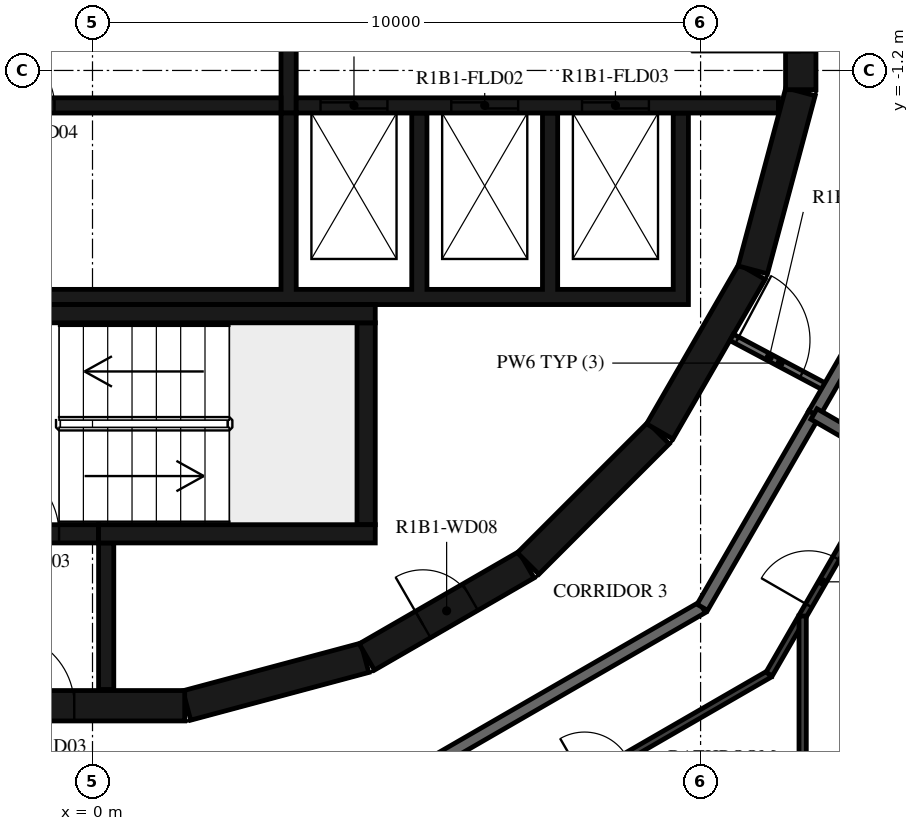
"""IFC4 building model, lengths in metres.
Left out: names, types, materials, properties, quantities, classifications, styles, units other than length and angle.
Written with IfcOpenShell. Run it as: python <this file> out.ifc"""

import sys

from ifc_helpers import new_model, si_unit, direction, frame, frame_2d, origin, place, context, subcontext, project, spatial, polyline, rectangle, outline, extrude, element, fill, save


model = new_model("IFC4")
c1 = context("Model", 3, precision=1e-05, world=origin(), true_north=direction((0.0, 1.0)))
c2 = subcontext(c1, "Body", "Model", "MODEL_VIEW")
j1 = project(units=[si_unit("LENGTHUNIT", "METRE"), si_unit("PLANEANGLEUNIT", "RADIAN")], contexts=[c1])
p1 = place(None, origin())
s1 = spatial("IfcSite", under=j1, at=p1, CompositionType="ELEMENT")
p2 = place(p1, origin())
s2 = spatial("IfcBuilding", under=s1, at=p2, CompositionType="ELEMENT")
p3 = place(p2, frame((0.0, 0.0, 48.9)))
s3 = spatial("IfcBuildingStorey", under=s2, at=p3, CompositionType="ELEMENT", Elevation=48.9)
p4 = place(p3, frame((1.55, -11.643, 0.0), z_axis=(0.0, 0.0, 1.0), x_axis=(0.965948410781, 0.258734743916, 0.0)))
e1 = element("IfcWall", 1, at=p4, inside=s3, PredefinedType="SHEAR", context=c2, shape_type="SweptSolid", body=[
    extrude(rectangle(XDim=3.033, YDim=0.5, at=frame_2d((1.516, 0.0))), origin(), (0.0, 0.0, 1.0), 3.12),
])
p5 = place(p3, frame((4.51, -10.845, 0.0), z_axis=(0.0, 0.0, 1.0), x_axis=(0.865975092491, 0.500087131594, 0.0)))
e2 = element("IfcWall", 2, at=p5, inside=s3, PredefinedType="SHEAR", context=c2, shape_type="SweptSolid", body=[
    extrude(rectangle(XDim=3.033, YDim=0.5, at=frame_2d((1.516, 0.0))), origin(), (0.0, 0.0, 1.0), 3.12),
])
p6 = place(p5, frame((1.066, 0.0, 0.0)))
e3 = element("IfcOpeningElement", 3, at=p6, cuts=e2, PredefinedType="OPENING", context=c2, shape_type="SweptSolid", body=[
    extrude(rectangle(XDim=0.9, YDim=2.1, at=frame_2d((0.45, 1.05))), frame((0.0, 0.26, 0.0), z_axis=(0.0, -1.0, 0.0), x_axis=(1.0, 0.0, 0.0)), (0.0, 0.0, 1.0), 0.52),
])
p7 = place(p3, frame((7.164, -9.308, 0.0), z_axis=(0.0, 0.0, 1.0), x_axis=(0.707106781187, 0.707106781187, 0.0)))
e4 = element("IfcWall", 4, at=p7, inside=s3, PredefinedType="SHEAR", context=c2, shape_type="SweptSolid", body=[
    extrude(rectangle(XDim=3.032, YDim=0.5, at=frame_2d((1.516, 0.0))), origin(), (0.0, 0.0, 1.0), 3.12),
])
for number, where, z_axis, x_axis in (
    (5, (9.329, -7.137, 0.0), (0.0, 0.0, 1.0), (0.5, 0.866, 0.0)),
    (6, (10.858, -4.479, 0.0), (0.0, 0.0, 1.0), (0.259, 0.966, 0.0)),
):
    element("IfcWall", number, at=place(p3, frame(where, z_axis=z_axis, x_axis=x_axis)), inside=s3, PredefinedType="SHEAR", context=c2, shape_type="SweptSolid", body=[
        extrude(rectangle(XDim=3.033, YDim=0.5, at=frame_2d((1.516, 0.0))), origin(), (0.0, 0.0, 1.0), 3.12),
    ])
p8 = place(p3, frame((11.647, -1.516, 0.0), z_axis=(0.0, 0.0, 1.0), x_axis=(0.0, 1.0, 0.0)))
e7 = element("IfcWall", 7, at=p8, inside=s3, PredefinedType="SHEAR", context=c2, shape_type="SweptSolid", body=[
    extrude(rectangle(XDim=3.033, YDim=0.5, at=frame_2d((1.516, 0.0))), origin(), (0.0, 0.0, 1.0), 3.12),
])
p9 = place(p8, frame((0.616, 0.0, 0.0)))
e8 = element("IfcOpeningElement", 8, at=p9, cuts=e7, PredefinedType="OPENING", context=c2, shape_type="SweptSolid", body=[
    extrude(rectangle(XDim=1.8, YDim=2.1, at=frame_2d((0.9, 1.05))), frame((0.0, 0.26, 0.0), z_axis=(0.0, -1.0, 0.0), x_axis=(1.0, 0.0, 0.0)), (0.0, 0.0, 1.0), 0.52),
])
p10 = place(p3, frame((-1.516, -11.647, 0.0), z_axis=(0.0, 0.0, 1.0), x_axis=(1.0, 0.0, 0.0)))
e9 = element("IfcWall", 9, at=p10, inside=s3, PredefinedType="SHEAR", context=c2, shape_type="SweptSolid", body=[
    extrude(rectangle(XDim=3.033, YDim=0.5, at=frame_2d((1.516, 0.0))), origin(), (0.0, 0.0, 1.0), 3.12),
])
p11 = place(p10, frame((0.016, 0.0, 0.0)))
e10 = element("IfcOpeningElement", 10, at=p11, cuts=e9, PredefinedType="OPENING", context=c2, shape_type="SweptSolid", body=[
    extrude(rectangle(XDim=1.2, YDim=2.1, at=frame_2d((0.6, 1.05))), frame((0.0, 0.26, 0.0), z_axis=(0.0, -1.0, 0.0), x_axis=(1.0, 0.0, 0.0)), (0.0, 0.0, 1.0), 0.52),
])
p12 = place(p3, frame((-2.4, -5.2, 0.0), z_axis=(0.0, 0.0, 1.0), x_axis=(1.0, 0.0, 0.0)))
e11 = element("IfcWall", 11, at=p12, inside=s3, PredefinedType="SHEAR", context=c2, shape_type="SweptSolid", body=[
    extrude(rectangle(XDim=7.05, YDim=0.3, at=frame_2d((3.525, 0.0))), origin(), (0.0, 0.0, 1.0), 3.12),
])
p13 = place(p3, frame((4.5, -8.67, 0.0), z_axis=(0.0, 0.0, 1.0), x_axis=(0.0, 1.0, 0.0)))
e12 = element("IfcWall", 12, at=p13, inside=s3, PredefinedType="SHEAR", context=c2, shape_type="SweptSolid", body=[
    extrude(rectangle(XDim=3.32, YDim=0.3, at=frame_2d((1.66, 0.0))), origin(), (0.0, 0.0, 1.0), 3.12),
])
p14 = place(p3, frame((0.1, -8.82, 0.0), z_axis=(0.0, 0.0, 1.0), x_axis=(1.0, 0.0, 0.0)))
e13 = element("IfcWall", 13, at=p14, inside=s3, PredefinedType="SHEAR", context=c2, shape_type="SweptSolid", body=[
    extrude(rectangle(XDim=4.55, YDim=0.3, at=frame_2d((2.275, 0.0))), origin(), (0.0, 0.0, 1.0), 3.12),
])
p15 = place(p3, frame((-2.4, -8.82, 0.0), z_axis=(0.0, 0.0, 1.0), x_axis=(1.0, 0.0, 0.0)))
e14 = element("IfcWall", 14, at=p15, inside=s3, PredefinedType="SHEAR", context=c2, shape_type="SweptSolid", body=[
    extrude(rectangle(XDim=2.5, YDim=0.3, at=frame_2d((1.25, 0.0))), origin(), (0.0, 0.0, 1.0), 3.12),
])
p16 = place(p15, frame((0.65, 0.0, 0.0)))
e15 = element("IfcOpeningElement", 15, at=p16, cuts=e14, PredefinedType="OPENING", context=c2, shape_type="SweptSolid", body=[
    extrude(rectangle(XDim=1.2, YDim=2.1, at=frame_2d((0.6, 1.05))), frame((0.0, 0.16, 0.0), z_axis=(0.0, -1.0, 0.0), x_axis=(1.0, 0.0, 0.0)), (0.0, 0.0, 1.0), 0.32),
])
p17 = place(p3, frame((0.225, -8.97, 0.0), z_axis=(0.0, 0.0, 1.0), x_axis=(0.0, -1.0, 0.0)))
e16 = element("IfcWall", 16, at=p17, inside=s3, PredefinedType="SHEAR", context=c2, shape_type="SweptSolid", body=[
    extrude(rectangle(XDim=2.41, YDim=0.25, at=frame_2d((1.205, 0.0))), origin(), (0.0, 0.0, 1.0), 3.12),
])
p18 = place(p3, origin())
e17 = element("IfcWall", 17, at=p18, inside=s3, PredefinedType="SHEAR", context=c2, shape_type="SweptSolid", body=[
    extrude(outline(polyline([(9.8, -5.05), (9.8, -4.8), (9.8, -1.9), (9.55, -1.9), (9.55, -4.8), (7.65, -4.8), (7.65, -1.9), (7.4, -1.9), (7.4, -4.8), (5.5, -4.8), (5.5, -1.9), (5.25, -1.9), (5.25, -4.8), (3.35, -4.8), (3.35, -1.9), (3.1, -1.9), (3.1, -4.8), (-5.25, -4.8), (-5.25, -1.9), (-5.5, -1.9), (-5.5, -4.8), (-7.4, -4.8), (-7.4, -1.9), (-7.65, -1.9), (-7.65, -4.8), (-9.55, -4.8), (-9.55, -1.9), (-9.8, -1.9), (-9.8, -4.8), (-9.8, -5.05), (9.8, -5.05)])), origin(), (0.0, 0.0, 1.0), 3.12),
])
p19 = place(p3, frame((-11.28, -1.775, 0.0), z_axis=(0.0, 0.0, 1.0), x_axis=(1.0, 0.0, 0.0)))
e18 = element("IfcWall", 18, at=p19, inside=s3, PredefinedType="SHEAR", context=c2, shape_type="SweptSolid", body=[
    extrude(rectangle(XDim=14.38, YDim=0.25, at=frame_2d((7.19, 0.0))), origin(), (0.0, 0.0, 1.0), 3.12),
])
p20 = place(p19, frame((9.755, 0.0, 0.0)))
e19 = element("IfcOpeningElement", 19, at=p20, cuts=e18, PredefinedType="OPENING", context=c2, shape_type="SweptSolid", body=[
    extrude(rectangle(XDim=0.9, YDim=2.1, at=frame_2d((0.45, 1.05))), frame((0.0, 0.135, 0.0), z_axis=(0.0, -1.0, 0.0), x_axis=(1.0, 0.0, 0.0)), (0.0, 0.0, 1.0), 0.27),
])
p21 = place(p3, frame((3.35, -1.775, 0.0), z_axis=(0.0, 0.0, 1.0), x_axis=(1.0, 0.0, 0.0)))
e20 = element("IfcWall", 20, at=p21, inside=s3, PredefinedType="SHEAR", context=c2, shape_type="SweptSolid", body=[
    extrude(rectangle(XDim=7.93, YDim=0.25, at=frame_2d((3.965, 0.0))), origin(), (0.0, 0.0, 1.0), 3.12),
])
p22 = place(p21, frame((0.4, 0.0, 0.0)))
e21 = element("IfcOpeningElement", 21, at=p22, cuts=e20, PredefinedType="OPENING", context=c2, shape_type="SweptSolid", body=[
    extrude(rectangle(XDim=1.1, YDim=2.4, at=frame_2d((0.55, 1.2))), frame((0.0, 0.135, 0.0), z_axis=(0.0, -1.0, 0.0), x_axis=(1.0, 0.0, 0.0)), (0.0, 0.0, 1.0), 0.27),
])
p23 = place(p21, frame((2.55, 0.0, 0.0)))
e22 = element("IfcOpeningElement", 22, at=p23, cuts=e20, PredefinedType="OPENING", context=c2, shape_type="SweptSolid", body=[
    extrude(rectangle(XDim=1.1, YDim=2.4, at=frame_2d((0.55, 1.2))), frame((0.0, 0.135, 0.0), z_axis=(0.0, -1.0, 0.0), x_axis=(1.0, 0.0, 0.0)), (0.0, 0.0, 1.0), 0.27),
])
p24 = place(p21, frame((4.7, 0.0, 0.0)))
e23 = element("IfcOpeningElement", 23, at=p24, cuts=e20, PredefinedType="OPENING", context=c2, shape_type="SweptSolid", body=[
    extrude(rectangle(XDim=1.1, YDim=2.4, at=frame_2d((0.55, 1.2))), frame((0.0, 0.135, 0.0), z_axis=(0.0, -1.0, 0.0), x_axis=(1.0, 0.0, 0.0)), (0.0, 0.0, 1.0), 0.27),
])
p25 = place(p3, frame((3.225, -1.9, 0.0), z_axis=(0.0, 0.0, 1.0), x_axis=(0.0, 1.0, 0.0)))
e24 = element("IfcWall", 24, at=p25, inside=s3, PredefinedType="SHEAR", context=c2, shape_type="SweptSolid", body=[
    extrude(rectangle(XDim=3.8, YDim=0.25, at=frame_2d((1.9, 0.0))), origin(), (0.0, 0.0, 1.0), 3.12),
])
p26 = place(p3, frame((10.511, -5.589, 0.0), z_axis=(0.0, 0.0, 1.0), x_axis=(0.88294043061, -0.469485032769, 0.0)))
e25 = element("IfcWall", 25, at=p26, inside=s3, PredefinedType="PARTITIONING", context=c2, shape_type="SweptSolid", body=[
    extrude(rectangle(XDim=1.804, YDim=0.12, at=frame_2d((0.902, 0.0))), origin(), (0.0, 0.0, 1.0), 3.12),
])
p27 = place(p26, frame((0.1, 0.0, 0.0)))
e26 = element("IfcOpeningElement", 26, at=p27, cuts=e25, PredefinedType="OPENING", context=c2, shape_type="SweptSolid", body=[
    extrude(rectangle(XDim=1.2, YDim=2.1, at=frame_2d((0.6, 1.05))), frame((0.0, 0.07, 0.0), z_axis=(0.0, -1.0, 0.0), x_axis=(1.0, 0.0, 0.0)), (0.0, 0.0, 1.0), 0.14),
])
p28 = place(p3, frame((11.865, -6.85, 0.0), z_axis=(0.0, 0.0, 1.0), x_axis=(0.499987270552, 0.86603275301, 0.0)))
e27 = element("IfcWall", 27, at=p28, inside=s3, PredefinedType="STANDARD", context=c2, shape_type="SweptSolid", body=[
    extrude(rectangle(XDim=3.671, YDim=0.2, at=frame_2d((1.835, 0.0))), origin(), (0.0, 0.0, 1.0), 3.12),
])
p29 = place(p3, frame((3.671, -13.7, 0.0), z_axis=(0.0, 0.0, 1.0), x_axis=(0.866024439905, 0.500001669485, 0.0)))
e28 = element("IfcWall", 28, at=p29, inside=s3, PredefinedType="STANDARD", context=c2, shape_type="SweptSolid", body=[
    extrude(rectangle(XDim=7.342, YDim=0.2, at=frame_2d((3.671, 0.0))), origin(), (0.0, 0.0, 1.0), 3.12),
])
p30 = place(p3, frame((10.029, -10.029, 0.0), z_axis=(0.0, 0.0, 1.0), x_axis=(0.50001606911, 0.866016126081, 0.0)))
e29 = element("IfcWall", 29, at=p30, inside=s3, PredefinedType="STANDARD", context=c2, shape_type="SweptSolid", body=[
    extrude(rectangle(XDim=3.671, YDim=0.2, at=frame_2d((1.835, 0.0))), origin(), (0.0, 0.0, 1.0), 3.12),
])
p31 = place(p3, frame((16.817, -9.709, 0.0), z_axis=(0.0, 0.0, 1.0), x_axis=(-0.86604338933, 0.499968846828, 0.0)))
e30 = element("IfcWall", 30, at=p31, inside=s3, PredefinedType="STANDARD", context=c2, shape_type="SweptSolid", body=[
    extrude(rectangle(XDim=5.718, YDim=0.2, at=frame_2d((2.859, 0.0))), origin(), (0.0, 0.0, 1.0), 3.12),
])
p32 = place(p3, frame((4.613, -14.888, 0.0), z_axis=(0.0, 0.0, 1.0), x_axis=(0.866025608725, 0.499999645032, 0.0)))
e31 = element("IfcWall", 31, at=p32, inside=s3, PredefinedType="PARTITIONING", context=c2, shape_type="SweptSolid", body=[
    extrude(rectangle(XDim=7.522, YDim=0.12, at=frame_2d((3.761, 0.0))), origin(), (0.0, 0.0, 1.0), 3.12),
])
p33 = place(p32, frame((4.017, 0.0, 0.0)))
e32 = element("IfcOpeningElement", 32, at=p33, cuts=e31, PredefinedType="OPENING", context=c2, shape_type="SweptSolid", body=[
    extrude(rectangle(XDim=0.8, YDim=2.1, at=frame_2d((0.4, 1.05))), frame((0.0, 0.07, 0.0), z_axis=(0.0, -1.0, 0.0), x_axis=(1.0, 0.0, 0.0)), (0.0, 0.0, 1.0), 0.14),
])
p34 = place(p3, frame((11.127, -11.127, 0.0), z_axis=(0.0, 0.0, 1.0), x_axis=(0.499987950692, 0.866032360344, 0.0)))
e33 = element("IfcWall", 33, at=p34, inside=s3, PredefinedType="PARTITIONING", context=c2, shape_type="SweptSolid", body=[
    extrude(rectangle(XDim=8.146, YDim=0.12, at=frame_2d((4.073, 0.0))), origin(), (0.0, 0.0, 1.0), 3.12),
])
p35 = place(p34, frame((1.303, 0.0, 0.0)))
e34 = element("IfcOpeningElement", 34, at=p35, cuts=e33, PredefinedType="OPENING", context=c2, shape_type="SweptSolid", body=[
    extrude(rectangle(XDim=0.9, YDim=2.1, at=frame_2d((0.45, 1.05))), frame((0.0, 0.07, 0.0), z_axis=(0.0, -1.0, 0.0), x_axis=(1.0, 0.0, 0.0)), (0.0, 0.0, 1.0), 0.14),
])
p36 = place(p34, frame((4.273, 0.0, 0.0)))
e35 = element("IfcOpeningElement", 35, at=p36, cuts=e33, PredefinedType="OPENING", context=c2, shape_type="SweptSolid", body=[
    extrude(rectangle(XDim=0.9, YDim=2.1, at=frame_2d((0.45, 1.05))), frame((0.0, 0.07, 0.0), z_axis=(0.0, -1.0, 0.0), x_axis=(1.0, 0.0, 0.0)), (0.0, 0.0, 1.0), 0.14),
])
p37 = place(p3, frame((11.678, -13.63, 0.0), z_axis=(0.0, 0.0, 1.0), x_axis=(0.0, 1.0, 0.0)))
e36 = element("IfcWall", 36, at=p37, inside=s3, PredefinedType="PARTITIONING", context=c2, shape_type="SweptSolid", body=[
    extrude(rectangle(XDim=3.458, YDim=0.12, at=frame_2d((1.729, 0.0))), origin(), (0.0, 0.0, 1.0), 3.12),
])
p38 = place(p16, origin())
e37 = element("IfcDoor", 37, at=p38, inside=s3, OperationType="SINGLE_SWING_LEFT", PredefinedType="DOOR", context=c2, shape_type="SweptSolid", body=[
    extrude(rectangle(XDim=1.2, YDim=2.1, at=frame_2d((0.6, 1.05))), frame((0.0, 0.025, 0.0), z_axis=(0.0, -1.0, 0.0), x_axis=(1.0, 0.0, 0.0)), (0.0, 0.0, 1.0), 0.05),
])
fill(e15, e37)
p39 = place(p11, origin())
e38 = element("IfcDoor", 38, at=p39, inside=s3, OperationType="SINGLE_SWING_RIGHT", PredefinedType="DOOR", context=c2, shape_type="SweptSolid", body=[
    extrude(rectangle(XDim=1.2, YDim=2.1, at=frame_2d((0.6, 1.05))), frame((0.0, 0.025, 0.0), z_axis=(0.0, -1.0, 0.0), x_axis=(1.0, 0.0, 0.0)), (0.0, 0.0, 1.0), 0.05),
])
fill(e10, e38)
p40 = place(p9, origin())
e39 = element("IfcDoor", 39, at=p40, inside=s3, OperationType="DOUBLE_DOOR_SINGLE_SWING", PredefinedType="DOOR", context=c2, shape_type="SweptSolid", body=[
    extrude(rectangle(XDim=1.8, YDim=2.1, at=frame_2d((0.9, 1.05))), frame((0.0, 0.025, 0.0), z_axis=(0.0, -1.0, 0.0), x_axis=(1.0, 0.0, 0.0)), (0.0, 0.0, 1.0), 0.05),
])
fill(e8, e39)
p41 = place(p22, origin())
e40 = element("IfcDoor", 40, at=p41, inside=s3, OperationType="DOUBLE_DOOR_SLIDING", PredefinedType="DOOR", context=c2, shape_type="SweptSolid", body=[
    extrude(rectangle(XDim=1.1, YDim=2.4, at=frame_2d((0.55, 1.2))), frame((0.0, 0.025, 0.0), z_axis=(0.0, -1.0, 0.0), x_axis=(1.0, 0.0, 0.0)), (0.0, 0.0, 1.0), 0.05),
])
fill(e21, e40)
p42 = place(p23, origin())
e41 = element("IfcDoor", 41, at=p42, inside=s3, OperationType="DOUBLE_DOOR_SLIDING", PredefinedType="DOOR", context=c2, shape_type="SweptSolid", body=[
    extrude(rectangle(XDim=1.1, YDim=2.4, at=frame_2d((0.55, 1.2))), frame((0.0, 0.025, 0.0), z_axis=(0.0, -1.0, 0.0), x_axis=(1.0, 0.0, 0.0)), (0.0, 0.0, 1.0), 0.05),
])
fill(e22, e41)
p43 = place(p24, origin())
e42 = element("IfcDoor", 42, at=p43, inside=s3, OperationType="DOUBLE_DOOR_SLIDING", PredefinedType="DOOR", context=c2, shape_type="SweptSolid", body=[
    extrude(rectangle(XDim=1.1, YDim=2.4, at=frame_2d((0.55, 1.2))), frame((0.0, 0.025, 0.0), z_axis=(0.0, -1.0, 0.0), x_axis=(1.0, 0.0, 0.0)), (0.0, 0.0, 1.0), 0.05),
])
fill(e23, e42)
p44 = place(p20, origin())
e43 = element("IfcDoor", 43, at=p44, inside=s3, OperationType="SINGLE_SWING_LEFT", PredefinedType="DOOR", context=c2, shape_type="SweptSolid", body=[
    extrude(rectangle(XDim=0.9, YDim=2.1, at=frame_2d((0.45, 1.05))), frame((0.0, 0.025, 0.0), z_axis=(0.0, -1.0, 0.0), x_axis=(1.0, 0.0, 0.0)), (0.0, 0.0, 1.0), 0.05),
])
fill(e19, e43)
p45 = place(p6, origin())
e44 = element("IfcDoor", 44, at=p45, inside=s3, OperationType="SINGLE_SWING_LEFT", PredefinedType="DOOR", context=c2, shape_type="SweptSolid", body=[
    extrude(rectangle(XDim=0.9, YDim=2.1, at=frame_2d((0.45, 1.05))), frame((0.0, 0.025, 0.0), z_axis=(0.0, -1.0, 0.0), x_axis=(1.0, 0.0, 0.0)), (0.0, 0.0, 1.0), 0.05),
])
fill(e3, e44)
p46 = place(p35, origin())
e45 = element("IfcDoor", 45, at=p46, inside=s3, OperationType="SINGLE_SWING_RIGHT", PredefinedType="DOOR", context=c2, shape_type="SweptSolid", body=[
    extrude(rectangle(XDim=0.9, YDim=2.1, at=frame_2d((0.45, 1.05))), frame((0.0, 0.025, 0.0), z_axis=(0.0, -1.0, 0.0), x_axis=(1.0, 0.0, 0.0)), (0.0, 0.0, 1.0), 0.05),
])
fill(e34, e45)
p47 = place(p27, origin())
e46 = element("IfcDoor", 46, at=p47, inside=s3, OperationType="DOUBLE_DOOR_SINGLE_SWING", PredefinedType="DOOR", context=c2, shape_type="SweptSolid", body=[
    extrude(rectangle(XDim=1.2, YDim=2.1, at=frame_2d((0.6, 1.05))), frame((0.0, 0.025, 0.0), z_axis=(0.0, -1.0, 0.0), x_axis=(1.0, 0.0, 0.0)), (0.0, 0.0, 1.0), 0.05),
])
fill(e26, e46)
save(model, sys.argv[1])
